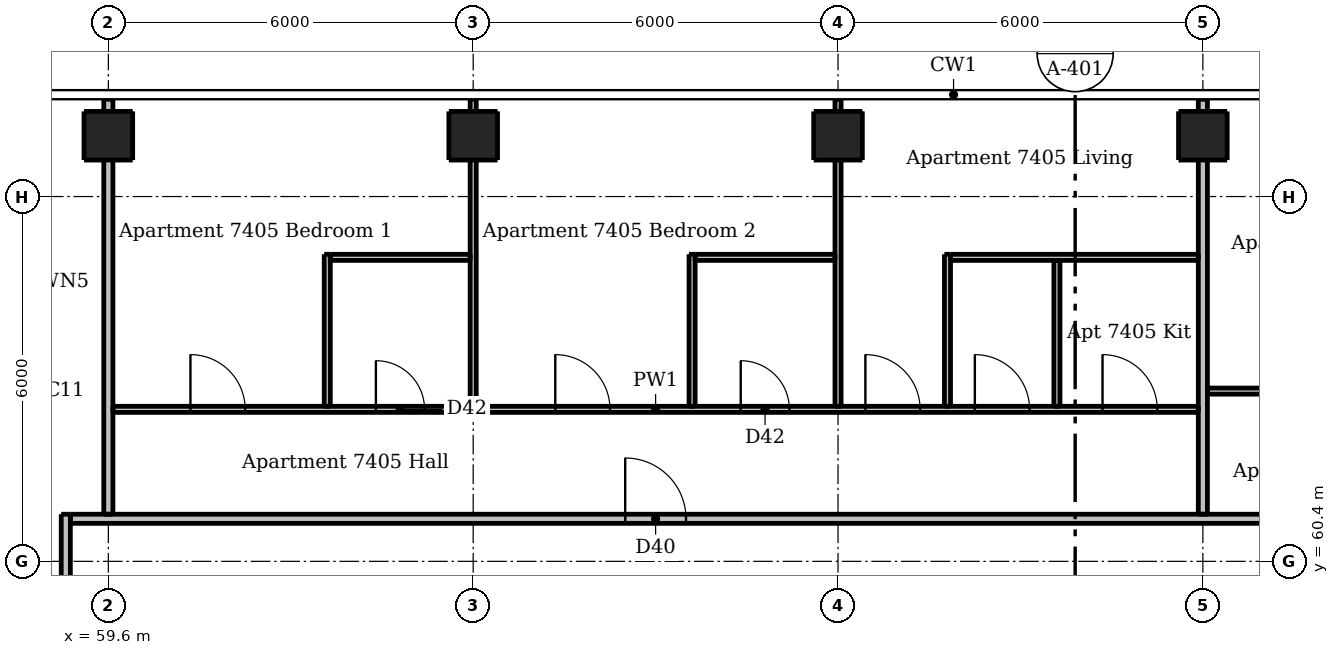
"""IFC4 building model, lengths in metres.
Left out: names, types, materials, properties, quantities, classifications, styles, units other than length and angle.
Written with IfcOpenShell. Run it as: python <this file> out.ifc"""

import sys

from ifc_helpers import new_model, si_unit, direction, frame, frame_2d, origin, origin_2d, place, context, subcontext, project, spatial, rectangle, extrude, element, fill, save


model = new_model("IFC4")
c1 = context("Model", 3, precision=1e-05, world=origin(), true_north=direction((0.0, 1.0)))
c2 = subcontext(c1, "Body", "Model", "MODEL_VIEW")
j1 = project(units=[si_unit("LENGTHUNIT", "METRE"), si_unit("PLANEANGLEUNIT", "RADIAN")], contexts=[c1])
p1 = place(None, origin())
s1 = spatial("IfcSite", under=j1, at=p1, CompositionType="ELEMENT")
p2 = place(p1, origin())
s2 = spatial("IfcBuilding", under=s1, at=p2, CompositionType="ELEMENT")
p3 = place(p2, frame((0.0, 0.0, 275.2)))
s3 = spatial("IfcBuildingStorey", under=s2, at=p3, CompositionType="ELEMENT", Elevation=275.2)
for number, where, z_axis, x_axis in (
    (1, (59.6, 67.4, 0.0), (0.0, 0.0, 1.0), (1.0, 0.0, 0.0)),
    (2, (65.6, 67.4, 0.0), (0.0, 0.0, 1.0), (1.0, 0.0, 0.0)),
    (3, (71.6, 67.4, 0.0), (0.0, 0.0, 1.0), (1.0, 0.0, 0.0)),
    (4, (77.6, 67.4, 0.0), (0.0, 0.0, 1.0), (1.0, 0.0, 0.0)),
):
    element("IfcColumn", number, at=place(p3, frame(where, z_axis=z_axis, x_axis=x_axis)), inside=s3, PredefinedType="COLUMN", context=c2, shape_type="SweptSolid", body=[
        extrude(rectangle(XDim=0.8, YDim=0.8, at=origin_2d()), origin(), (0.0, 0.0, 1.0), 3.05),
    ])
p4 = place(p3, frame((63.2, 62.95, 0.0), z_axis=(0.0, 0.0, 1.0), x_axis=(0.0, 1.0, 0.0)))
e5 = element("IfcWall", 5, at=p4, inside=s3, PredefinedType="PARTITIONING", context=c2, shape_type="SweptSolid", body=[
    extrude(rectangle(XDim=2.5, YDim=0.1, at=frame_2d((1.25, 0.0))), origin(), (0.0, 0.0, 1.0), 3.05),
])
p5 = place(p3, frame((65.6, 62.95, 0.0), z_axis=(0.0, 0.0, 1.0), x_axis=(0.0, 1.0, 0.0)))
e6 = element("IfcWall", 6, at=p5, inside=s3, PredefinedType="PARTITIONING", context=c2, shape_type="SweptSolid", body=[
    extrude(rectangle(XDim=5.05, YDim=0.1, at=frame_2d((2.525, 0.0))), origin(), (0.0, 0.0, 1.0), 2.516),
])
p6 = place(p3, frame((69.2, 62.95, 0.0), z_axis=(0.0, 0.0, 1.0), x_axis=(0.0, 1.0, 0.0)))
e7 = element("IfcWall", 7, at=p6, inside=s3, PredefinedType="PARTITIONING", context=c2, shape_type="SweptSolid", body=[
    extrude(rectangle(XDim=2.5, YDim=0.1, at=frame_2d((1.25, 0.0))), origin(), (0.0, 0.0, 1.0), 3.05),
])
p7 = place(p3, frame((71.6, 62.95, 0.0), z_axis=(0.0, 0.0, 1.0), x_axis=(0.0, 1.0, 0.0)))
e8 = element("IfcWall", 8, at=p7, inside=s3, PredefinedType="PARTITIONING", context=c2, shape_type="SweptSolid", body=[
    extrude(rectangle(XDim=5.05, YDim=0.1, at=frame_2d((2.525, 0.0))), origin(), (0.0, 0.0, 1.0), 2.516),
])
p8 = place(p3, frame((73.4, 62.95, 0.0), z_axis=(0.0, 0.0, 1.0), x_axis=(0.0, 1.0, 0.0)))
e9 = element("IfcWall", 9, at=p8, inside=s3, PredefinedType="PARTITIONING", context=c2, shape_type="SweptSolid", body=[
    extrude(rectangle(XDim=2.5, YDim=0.1, at=frame_2d((1.25, 0.0))), origin(), (0.0, 0.0, 1.0), 3.05),
])
p9 = place(p3, frame((75.2, 62.95, 0.0), z_axis=(0.0, 0.0, 1.0), x_axis=(0.0, 1.0, 0.0)))
e10 = element("IfcWall", 10, at=p9, inside=s3, PredefinedType="PARTITIONING", context=c2, shape_type="SweptSolid", body=[
    extrude(rectangle(XDim=2.4, YDim=0.1, at=frame_2d((1.2, 0.0))), origin(), (0.0, 0.0, 1.0), 3.05),
])
for number, where, z_axis, x_axis in (
    (11, (63.25, 65.4, 0.0), (0.0, 0.0, 1.0), (1.0, 0.0, 0.0)),
    (12, (69.25, 65.4, 0.0), (0.0, 0.0, 1.0), (1.0, 0.0, 0.0)),
):
    element("IfcWall", number, at=place(p3, frame(where, z_axis=z_axis, x_axis=x_axis)), inside=s3, PredefinedType="PARTITIONING", context=c2, shape_type="SweptSolid", body=[
        extrude(rectangle(XDim=2.3, YDim=0.1, at=frame_2d((1.15, 0.0))), origin(), (0.0, 0.0, 1.0), 3.05),
    ])
p10 = place(p3, frame((73.45, 65.4, 0.0), z_axis=(0.0, 0.0, 1.0), x_axis=(1.0, 0.0, 0.0)))
e13 = element("IfcWall", 13, at=p10, inside=s3, PredefinedType="PARTITIONING", context=c2, shape_type="SweptSolid", body=[
    extrude(rectangle(XDim=4.075, YDim=0.1, at=frame_2d((2.038, 0.0))), origin(), (0.0, 0.0, 1.0), 3.05),
])
p11 = place(p3, frame((83.55, 63.2, 0.0), z_axis=(0.0, 0.0, 1.0), x_axis=(-1.0, 0.0, 0.0)))
e14 = element("IfcWall", 14, at=p11, inside=s3, PredefinedType="PARTITIONING", context=c2, shape_type="SweptSolid", body=[
    extrude(rectangle(XDim=5.875, YDim=0.1, at=frame_2d((2.938, 0.0))), origin(), (0.0, 0.0, 1.0), 3.05),
])
p12 = place(p11, frame((3.75, 0.0, 0.0)))
e15 = element("IfcOpeningElement", 15, at=p12, cuts=e14, PredefinedType="OPENING", context=c2, shape_type="SweptSolid", body=[
    extrude(rectangle(XDim=0.8, YDim=2.1, at=frame_2d((0.4, 1.05))), frame((0.0, 0.06, 0.0), z_axis=(0.0, -1.0, 0.0), x_axis=(1.0, 0.0, 0.0)), (0.0, 0.0, 1.0), 0.12),
])
p13 = place(p3, frame((59.675, 62.9, 0.0), z_axis=(0.0, 0.0, 1.0), x_axis=(1.0, 0.0, 0.0)))
e16 = element("IfcWall", 16, at=p13, inside=s3, PredefinedType="PARTITIONING", context=c2, shape_type="SweptSolid", body=[
    extrude(rectangle(XDim=17.85, YDim=0.1, at=frame_2d((8.925, 0.0))), origin(), (0.0, 0.0, 1.0), 3.05),
])
p14 = place(p13, frame((12.375, 0.0, 0.0)))
e17 = element("IfcOpeningElement", 17, at=p14, cuts=e16, PredefinedType="OPENING", context=c2, shape_type="SweptSolid", body=[
    extrude(rectangle(XDim=0.9, YDim=2.1, at=frame_2d((0.45, 1.05))), frame((0.0, 0.06, 0.0), z_axis=(0.0, -1.0, 0.0), x_axis=(1.0, 0.0, 0.0)), (0.0, 0.0, 1.0), 0.12),
])
p15 = place(p13, frame((16.275, 0.0, 0.0)))
e18 = element("IfcOpeningElement", 18, at=p15, cuts=e16, PredefinedType="OPENING", context=c2, shape_type="SweptSolid", body=[
    extrude(rectangle(XDim=0.9, YDim=2.1, at=frame_2d((0.45, 1.05))), frame((0.0, 0.06, 0.0), z_axis=(0.0, -1.0, 0.0), x_axis=(1.0, 0.0, 0.0)), (0.0, 0.0, 1.0), 0.12),
])
p16 = place(p13, frame((14.175, 0.0, 0.0)))
e19 = element("IfcOpeningElement", 19, at=p16, cuts=e16, PredefinedType="OPENING", context=c2, shape_type="SweptSolid", body=[
    extrude(rectangle(XDim=0.9, YDim=2.1, at=frame_2d((0.45, 1.05))), frame((0.0, 0.06, 0.0), z_axis=(0.0, -1.0, 0.0), x_axis=(1.0, 0.0, 0.0)), (0.0, 0.0, 1.0), 0.12),
])
p17 = place(p13, frame((1.275, 0.0, 0.0)))
e20 = element("IfcOpeningElement", 20, at=p17, cuts=e16, PredefinedType="OPENING", context=c2, shape_type="SweptSolid", body=[
    extrude(rectangle(XDim=0.9, YDim=2.1, at=frame_2d((0.45, 1.05))), frame((0.0, 0.06, 0.0), z_axis=(0.0, -1.0, 0.0), x_axis=(1.0, 0.0, 0.0)), (0.0, 0.0, 1.0), 0.12),
])
p18 = place(p13, frame((7.275, 0.0, 0.0)))
e21 = element("IfcOpeningElement", 21, at=p18, cuts=e16, PredefinedType="OPENING", context=c2, shape_type="SweptSolid", body=[
    extrude(rectangle(XDim=0.9, YDim=2.1, at=frame_2d((0.45, 1.05))), frame((0.0, 0.06, 0.0), z_axis=(0.0, -1.0, 0.0), x_axis=(1.0, 0.0, 0.0)), (0.0, 0.0, 1.0), 0.12),
])
p19 = place(p13, frame((4.325, 0.0, 0.0)))
e22 = element("IfcOpeningElement", 22, at=p19, cuts=e16, PredefinedType="OPENING", context=c2, shape_type="SweptSolid", body=[
    extrude(rectangle(XDim=0.8, YDim=2.1, at=frame_2d((0.4, 1.05))), frame((0.0, 0.06, 0.0), z_axis=(0.0, -1.0, 0.0), x_axis=(1.0, 0.0, 0.0)), (0.0, 0.0, 1.0), 0.12),
])
p20 = place(p13, frame((10.325, 0.0, 0.0)))
e23 = element("IfcOpeningElement", 23, at=p20, cuts=e16, PredefinedType="OPENING", context=c2, shape_type="SweptSolid", body=[
    extrude(rectangle(XDim=0.8, YDim=2.1, at=frame_2d((0.4, 1.05))), frame((0.0, 0.06, 0.0), z_axis=(0.0, -1.0, 0.0), x_axis=(1.0, 0.0, 0.0)), (0.0, 0.0, 1.0), 0.12),
])
p21 = place(p3, frame((58.9, 30.325, 0.0), z_axis=(0.0, 0.0, 1.0), x_axis=(0.0, 1.0, 0.0)))
e24 = element("IfcWall", 24, at=p21, inside=s3, PredefinedType="PARTITIONING", context=c2, shape_type="SweptSolid", body=[
    extrude(rectangle(XDim=30.85, YDim=0.15, at=frame_2d((15.425, 0.0))), origin(), (0.0, 0.0, 1.0), 3.05),
])
p22 = place(p21, frame((9.225, 0.0, 0.0)))
e25 = element("IfcOpeningElement", 25, at=p22, cuts=e24, PredefinedType="OPENING", context=c2, shape_type="SweptSolid", body=[
    extrude(rectangle(XDim=1.0, YDim=2.1, at=frame_2d((0.5, 1.05))), frame((0.0, 0.085, 0.0), z_axis=(0.0, -1.0, 0.0), x_axis=(1.0, 0.0, 0.0)), (0.0, 0.0, 1.0), 0.17),
])
p23 = place(p21, frame((26.925, 0.0, 0.0)))
e26 = element("IfcOpeningElement", 26, at=p23, cuts=e24, PredefinedType="OPENING", context=c2, shape_type="SweptSolid", body=[
    extrude(rectangle(XDim=1.0, YDim=2.1, at=frame_2d((0.5, 1.05))), frame((0.0, 0.085, 0.0), z_axis=(0.0, -1.0, 0.0), x_axis=(1.0, 0.0, 0.0)), (0.0, 0.0, 1.0), 0.17),
])
p24 = place(p3, frame((59.6, 61.175, 0.0), z_axis=(0.0, 0.0, 1.0), x_axis=(0.0, 1.0, 0.0)))
e27 = element("IfcWall", 27, at=p24, inside=s3, PredefinedType="PARTITIONING", context=c2, shape_type="SweptSolid", body=[
    extrude(rectangle(XDim=6.825, YDim=0.15, at=frame_2d((3.413, 0.0))), origin(), (0.0, 0.0, 1.0), 2.51),
])
p25 = place(p3, frame((77.6, 61.175, 0.0), z_axis=(0.0, 0.0, 1.0), x_axis=(0.0, 1.0, 0.0)))
e28 = element("IfcWall", 28, at=p25, inside=s3, PredefinedType="PARTITIONING", context=c2, shape_type="SweptSolid", body=[
    extrude(rectangle(XDim=6.825, YDim=0.15, at=frame_2d((3.413, 0.0))), origin(), (0.0, 0.0, 1.0), 2.516),
])
p26 = place(p3, frame((58.975, 61.1, 0.0), z_axis=(0.0, 0.0, 1.0), x_axis=(1.0, 0.0, 0.0)))
e29 = element("IfcWall", 29, at=p26, inside=s3, PredefinedType="PARTITIONING", context=c2, shape_type="SweptSolid", body=[
    extrude(rectangle(XDim=29.25, YDim=0.15, at=frame_2d((14.625, 0.0))), origin(), (0.0, 0.0, 1.0), 3.05),
])
p27 = place(p26, frame((9.125, 0.0, 0.0)))
e30 = element("IfcOpeningElement", 30, at=p27, cuts=e29, PredefinedType="OPENING", context=c2, shape_type="SweptSolid", body=[
    extrude(rectangle(XDim=1.0, YDim=2.1, at=frame_2d((0.5, 1.05))), frame((0.0, 0.085, 0.0), z_axis=(0.0, -1.0, 0.0), x_axis=(1.0, 0.0, 0.0)), (0.0, 0.0, 1.0), 0.17),
])
p28 = place(p26, frame((26.475, 0.0, 0.0)))
e31 = element("IfcOpeningElement", 31, at=p28, cuts=e29, PredefinedType="OPENING", context=c2, shape_type="SweptSolid", body=[
    extrude(rectangle(XDim=1.0, YDim=2.1, at=frame_2d((0.5, 1.05))), frame((0.0, 0.085, 0.0), z_axis=(0.0, -1.0, 0.0), x_axis=(1.0, 0.0, 0.0)), (0.0, 0.0, 1.0), 0.17),
])
p29 = place(p27, origin())
e32 = element("IfcDoor", 32, at=p29, inside=s3, OperationType="SINGLE_SWING_LEFT", PredefinedType="DOOR", context=c2, shape_type="SweptSolid", body=[
    extrude(rectangle(XDim=1.0, YDim=2.1, at=frame_2d((0.5, 1.05))), frame((0.0, 0.025, 0.0), z_axis=(0.0, -1.0, 0.0), x_axis=(1.0, 0.0, 0.0)), (0.0, 0.0, 1.0), 0.05),
])
fill(e30, e32)
p30 = place(p14, origin())
e33 = element("IfcDoor", 33, at=p30, inside=s3, OperationType="SINGLE_SWING_LEFT", PredefinedType="DOOR", context=c2, shape_type="SweptSolid", body=[
    extrude(rectangle(XDim=0.9, YDim=2.1, at=frame_2d((0.45, 1.05))), frame((0.0, 0.025, 0.0), z_axis=(0.0, -1.0, 0.0), x_axis=(1.0, 0.0, 0.0)), (0.0, 0.0, 1.0), 0.05),
])
fill(e17, e33)
p31 = place(p15, origin())
e34 = element("IfcDoor", 34, at=p31, inside=s3, OperationType="SINGLE_SWING_LEFT", PredefinedType="DOOR", context=c2, shape_type="SweptSolid", body=[
    extrude(rectangle(XDim=0.9, YDim=2.1, at=frame_2d((0.45, 1.05))), frame((0.0, 0.025, 0.0), z_axis=(0.0, -1.0, 0.0), x_axis=(1.0, 0.0, 0.0)), (0.0, 0.0, 1.0), 0.05),
])
fill(e18, e34)
p32 = place(p16, origin())
e35 = element("IfcDoor", 35, at=p32, inside=s3, OperationType="SINGLE_SWING_LEFT", PredefinedType="DOOR", context=c2, shape_type="SweptSolid", body=[
    extrude(rectangle(XDim=0.9, YDim=2.1, at=frame_2d((0.45, 1.05))), frame((0.0, 0.025, 0.0), z_axis=(0.0, -1.0, 0.0), x_axis=(1.0, 0.0, 0.0)), (0.0, 0.0, 1.0), 0.05),
])
fill(e19, e35)
p33 = place(p17, origin())
e36 = element("IfcDoor", 36, at=p33, inside=s3, OperationType="SINGLE_SWING_LEFT", PredefinedType="DOOR", context=c2, shape_type="SweptSolid", body=[
    extrude(rectangle(XDim=0.9, YDim=2.1, at=frame_2d((0.45, 1.05))), frame((0.0, 0.025, 0.0), z_axis=(0.0, -1.0, 0.0), x_axis=(1.0, 0.0, 0.0)), (0.0, 0.0, 1.0), 0.05),
])
fill(e20, e36)
p34 = place(p18, origin())
e37 = element("IfcDoor", 37, at=p34, inside=s3, OperationType="SINGLE_SWING_LEFT", PredefinedType="DOOR", context=c2, shape_type="SweptSolid", body=[
    extrude(rectangle(XDim=0.9, YDim=2.1, at=frame_2d((0.45, 1.05))), frame((0.0, 0.025, 0.0), z_axis=(0.0, -1.0, 0.0), x_axis=(1.0, 0.0, 0.0)), (0.0, 0.0, 1.0), 0.05),
])
fill(e21, e37)
p35 = place(p19, origin())
e38 = element("IfcDoor", 38, at=p35, inside=s3, OperationType="SINGLE_SWING_LEFT", PredefinedType="DOOR", context=c2, shape_type="SweptSolid", body=[
    extrude(rectangle(XDim=0.8, YDim=2.1, at=frame_2d((0.4, 1.05))), frame((0.0, 0.025, 0.0), z_axis=(0.0, -1.0, 0.0), x_axis=(1.0, 0.0, 0.0)), (0.0, 0.0, 1.0), 0.05),
])
fill(e22, e38)
p36 = place(p20, origin())
e39 = element("IfcDoor", 39, at=p36, inside=s3, OperationType="SINGLE_SWING_LEFT", PredefinedType="DOOR", context=c2, shape_type="SweptSolid", body=[
    extrude(rectangle(XDim=0.8, YDim=2.1, at=frame_2d((0.4, 1.05))), frame((0.0, 0.025, 0.0), z_axis=(0.0, -1.0, 0.0), x_axis=(1.0, 0.0, 0.0)), (0.0, 0.0, 1.0), 0.05),
])
fill(e23, e39)
save(model, sys.argv[1])
